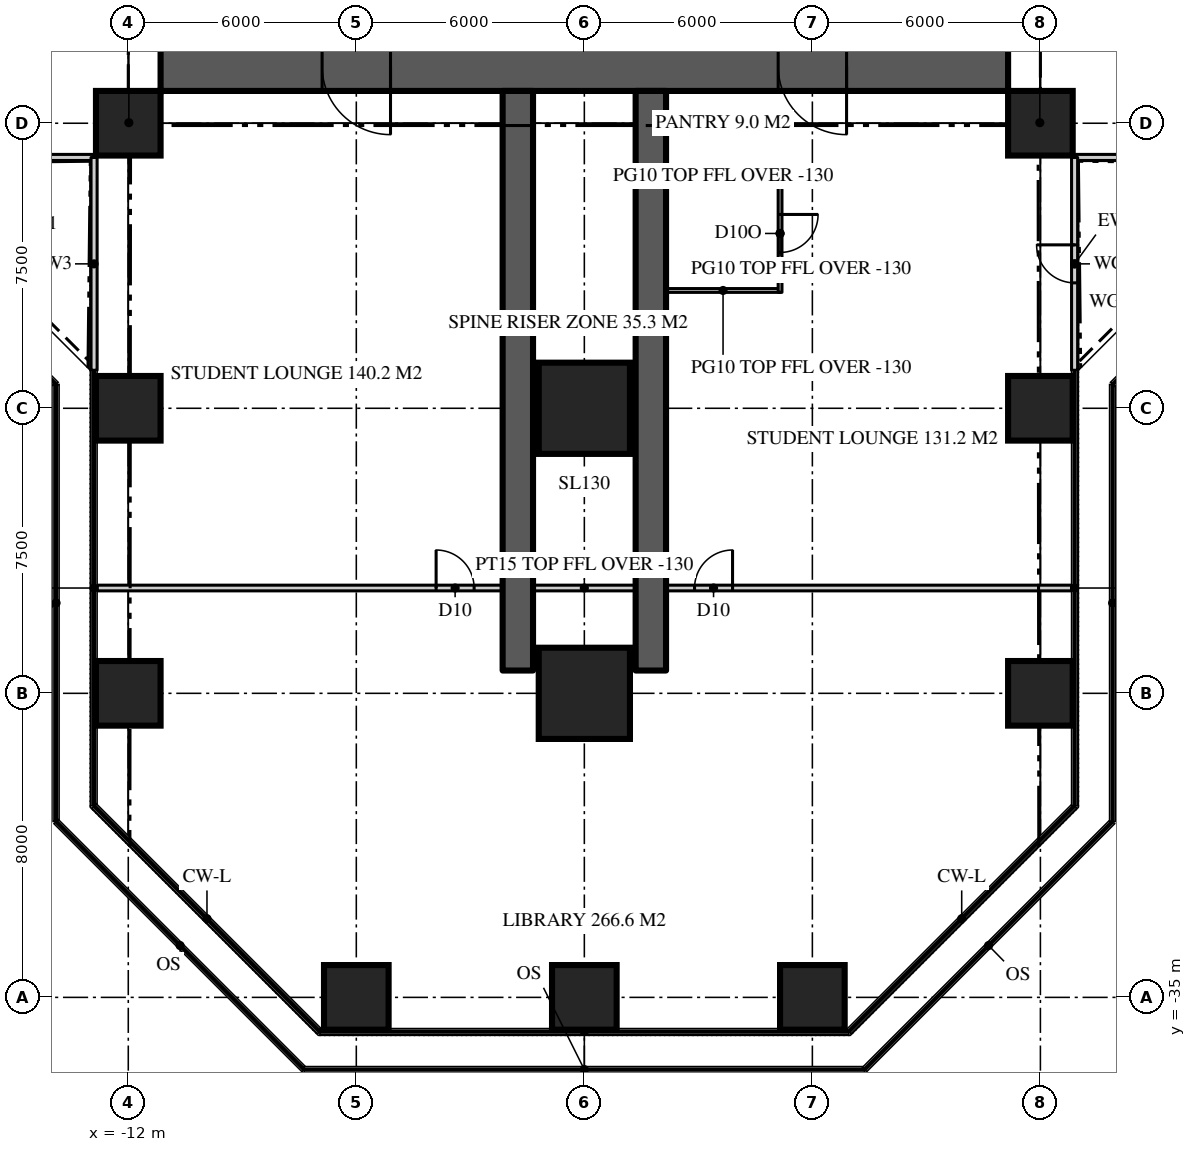
"""IFC4 building model, lengths in metres.
Left out: names, types, materials, properties, quantities, classifications, styles, units other than length and angle.
Written with IfcOpenShell. Run it as: python <this file> out.ifc"""

import sys

from ifc_helpers import new_model, si_unit, direction, frame, frame_2d, origin, origin_2d, place, context, subcontext, project, spatial, rectangle, extrude, element, fill, save


model = new_model("IFC4")
c1 = context("Model", 3, precision=1e-05, world=origin(), true_north=direction((0.0, 1.0)))
c2 = subcontext(c1, "Body", "Model", "MODEL_VIEW")
j1 = project(units=[si_unit("LENGTHUNIT", "METRE"), si_unit("PLANEANGLEUNIT", "RADIAN")], contexts=[c1])
p1 = place(None, origin())
s1 = spatial("IfcSite", under=j1, at=p1, CompositionType="ELEMENT")
p2 = place(p1, origin())
s2 = spatial("IfcBuilding", under=s1, at=p2, CompositionType="ELEMENT")
p3 = place(p2, frame((0.0, 0.0, 102.0)))
s3 = spatial("IfcBuildingStorey", under=s2, at=p3, CompositionType="ELEMENT", Elevation=102.0)
p4 = place(p3, frame((11.15, -10.5, 0.0), z_axis=(0.0, 0.0, 1.0), x_axis=(-1.0, 0.0, 0.0)))
e1 = element("IfcWall", 1, at=p4, inside=s3, PredefinedType="SHEAR", context=c2, shape_type="SweptSolid", body=[
    extrude(rectangle(XDim=22.3, YDim=1.3, at=frame_2d((11.15, 0.0))), origin(), (0.0, 0.0, 1.0), 3.9),
])
p5 = place(p4, frame((16.25, 0.0, 0.0)))
e2 = element("IfcOpeningElement", 2, at=p5, cuts=e1, PredefinedType="OPENING", context=c2, shape_type="SweptSolid", body=[
    extrude(rectangle(XDim=1.8, YDim=2.2, at=frame_2d((0.9, 1.1))), frame((0.0, 0.66, 0.0), z_axis=(0.0, -1.0, 0.0), x_axis=(1.0, 0.0, 0.0)), (0.0, 0.0, 1.0), 1.32),
])
p6 = place(p4, frame((4.25, 0.0, 0.0)))
e3 = element("IfcOpeningElement", 3, at=p6, cuts=e1, PredefinedType="OPENING", context=c2, shape_type="SweptSolid", body=[
    extrude(rectangle(XDim=1.8, YDim=2.2, at=frame_2d((0.9, 1.1))), frame((0.0, 0.66, 0.0), z_axis=(0.0, -1.0, 0.0), x_axis=(1.0, 0.0, 0.0)), (0.0, 0.0, 1.0), 1.32),
])
for number, where, z_axis, x_axis in (
    (4, (-1.75, -11.15, 0.0), (0.0, 0.0, 1.0), (0.0, -1.0, 0.0)),
    (5, (1.75, -11.15, 0.0), (0.0, 0.0, 1.0), (0.0, -1.0, 0.0)),
):
    element("IfcWall", number, at=place(p3, frame(where, z_axis=z_axis, x_axis=x_axis)), inside=s3, PredefinedType="SHEAR", context=c2, shape_type="SweptSolid", body=[
        extrude(rectangle(XDim=15.25, YDim=0.8, at=frame_2d((7.625, 0.0))), origin(), (0.0, 0.0, 1.0), 3.9),
    ])
for number, where, z_axis, x_axis in (
    (6, (-6.0, -35.0, 0.0), (0.0, 0.0, 1.0), (1.0, 0.0, 0.0)),
    (7, (0.0, -35.0, 0.0), (0.0, 0.0, 1.0), (1.0, 0.0, 0.0)),
    (8, (6.0, -35.0, 0.0), (0.0, 0.0, 1.0), (1.0, 0.0, 0.0)),
    (9, (-12.0, -27.0, 0.0), (0.0, 0.0, 1.0), (1.0, 0.0, 0.0)),
):
    element("IfcColumn", number, at=place(p3, frame(where, z_axis=z_axis, x_axis=x_axis)), inside=s3, PredefinedType="COLUMN", context=c2, shape_type="SweptSolid", body=[
        extrude(rectangle(XDim=1.7, YDim=1.7, at=origin_2d()), origin(), (0.0, 0.0, 1.0), 3.9),
    ])
p7 = place(p3, frame((0.0, -27.0, 0.0), z_axis=(0.0, 0.0, 1.0), x_axis=(1.0, 0.0, 0.0)))
e10 = element("IfcColumn", 10, at=p7, inside=s3, PredefinedType="COLUMN", context=c2, shape_type="SweptSolid", body=[
    extrude(rectangle(XDim=2.4, YDim=2.4, at=origin_2d()), origin(), (0.0, 0.0, 1.0), 3.9),
])
for number, where, z_axis, x_axis in (
    (11, (12.0, -27.0, 0.0), (0.0, 0.0, 1.0), (1.0, 0.0, 0.0)),
    (12, (-12.0, -19.5, 0.0), (0.0, 0.0, 1.0), (1.0, 0.0, 0.0)),
):
    element("IfcColumn", number, at=place(p3, frame(where, z_axis=z_axis, x_axis=x_axis)), inside=s3, PredefinedType="COLUMN", context=c2, shape_type="SweptSolid", body=[
        extrude(rectangle(XDim=1.7, YDim=1.7, at=origin_2d()), origin(), (0.0, 0.0, 1.0), 3.9),
    ])
p8 = place(p3, frame((0.0, -19.5, 0.0), z_axis=(0.0, 0.0, 1.0), x_axis=(1.0, 0.0, 0.0)))
e13 = element("IfcColumn", 13, at=p8, inside=s3, PredefinedType="COLUMN", context=c2, shape_type="SweptSolid", body=[
    extrude(rectangle(XDim=2.4, YDim=2.4, at=origin_2d()), origin(), (0.0, 0.0, 1.0), 3.9),
])
for number, where, z_axis, x_axis in (
    (14, (12.0, -19.5, 0.0), (0.0, 0.0, 1.0), (1.0, 0.0, 0.0)),
    (15, (-12.0, -12.0, 0.0), (0.0, 0.0, 1.0), (1.0, 0.0, 0.0)),
    (16, (12.0, -12.0, 0.0), (0.0, 0.0, 1.0), (1.0, 0.0, 0.0)),
):
    element("IfcColumn", number, at=place(p3, frame(where, z_axis=z_axis, x_axis=x_axis)), inside=s3, PredefinedType="COLUMN", context=c2, shape_type="SweptSolid", body=[
        extrude(rectangle(XDim=1.7, YDim=1.7, at=origin_2d()), origin(), (0.0, 0.0, 1.0), 3.9),
    ])
p9 = place(p3, frame((12.9, -12.9, 0.0), z_axis=(0.0, 0.0, 1.0), x_axis=(1.0, 0.0, 0.0)))
e17 = element("IfcWall", 17, at=p9, inside=s3, PredefinedType="SOLIDWALL", context=c2, shape_type="SweptSolid", body=[
    extrude(rectangle(XDim=5.6, YDim=0.16, at=frame_2d((2.8, 0.0))), origin(), (0.0, 0.0, 1.0), 3.77),
])
p10 = place(p3, frame((-18.5, -12.9, 0.0), z_axis=(0.0, 0.0, 1.0), x_axis=(1.0, 0.0, 0.0)))
e18 = element("IfcWall", 18, at=p10, inside=s3, PredefinedType="SOLIDWALL", context=c2, shape_type="SweptSolid", body=[
    extrude(rectangle(XDim=5.6, YDim=0.16, at=frame_2d((2.8, 0.0))), origin(), (0.0, 0.0, 1.0), 3.77),
])
p11 = place(p10, frame((2.3, 0.0, 0.0)))
e19 = element("IfcOpeningElement", 19, at=p11, cuts=e18, PredefinedType="OPENING", context=c2, shape_type="SweptSolid", body=[
    extrude(rectangle(XDim=1.0, YDim=2.2, at=frame_2d((0.5, 1.1))), frame((0.0, 0.09, 0.0), z_axis=(0.0, -1.0, 0.0), x_axis=(1.0, 0.0, 0.0)), (0.0, 0.0, 1.0), 0.18),
])
p12 = place(p3, frame((-12.9, -12.9, 0.0), z_axis=(0.0, 0.0, 1.0), x_axis=(0.0, -1.0, 0.0)))
e20 = element("IfcWall", 20, at=p12, inside=s3, PredefinedType="SOLIDWALL", context=c2, shape_type="SweptSolid", body=[
    extrude(rectangle(XDim=5.6, YDim=0.16, at=frame_2d((2.8, 0.0))), origin(), (0.0, 0.0, 1.0), 3.77),
])
p13 = place(p3, frame((12.9, -18.5, 0.0), z_axis=(0.0, 0.0, 1.0), x_axis=(0.0, 1.0, 0.0)))
e21 = element("IfcWall", 21, at=p13, inside=s3, PredefinedType="SOLIDWALL", context=c2, shape_type="SweptSolid", body=[
    extrude(rectangle(XDim=5.6, YDim=0.16, at=frame_2d((2.8, 0.0))), origin(), (0.0, 0.0, 1.0), 3.77),
])
p14 = place(p13, frame((2.3, 0.0, 0.0)))
e22 = element("IfcOpeningElement", 22, at=p14, cuts=e21, PredefinedType="OPENING", context=c2, shape_type="SweptSolid", body=[
    extrude(rectangle(XDim=1.0, YDim=2.2, at=frame_2d((0.5, 1.1))), frame((0.0, 0.09, 0.0), z_axis=(0.0, -1.0, 0.0), x_axis=(1.0, 0.0, 0.0)), (0.0, 0.0, 1.0), 0.18),
])
p15 = place(p3, frame((-12.82, -24.229, 0.0), z_axis=(0.0, 0.0, 1.0), x_axis=(1.0, 0.0, 0.0)))
e23 = element("IfcWall", 23, at=p15, inside=s3, PredefinedType="PARTITIONING", context=c2, shape_type="SweptSolid", body=[
    extrude(rectangle(XDim=25.64, YDim=0.15, at=frame_2d((12.82, 0.0))), origin(), (0.0, 0.0, 1.0), 3.77),
])
p16 = place(p15, frame((15.72, 0.0, 0.0)))
e24 = element("IfcOpeningElement", 24, at=p16, cuts=e23, PredefinedType="OPENING", context=c2, shape_type="SweptSolid", body=[
    extrude(rectangle(XDim=1.0, YDim=2.2, at=frame_2d((0.5, 1.1))), frame((0.0, 0.085, 0.0), z_axis=(0.0, -1.0, 0.0), x_axis=(1.0, 0.0, 0.0)), (0.0, 0.0, 1.0), 0.17),
])
p17 = place(p15, frame((8.92, 0.0, 0.0)))
e25 = element("IfcOpeningElement", 25, at=p17, cuts=e23, PredefinedType="OPENING", context=c2, shape_type="SweptSolid", body=[
    extrude(rectangle(XDim=1.0, YDim=2.2, at=frame_2d((0.5, 1.1))), frame((0.0, 0.085, 0.0), z_axis=(0.0, -1.0, 0.0), x_axis=(1.0, 0.0, 0.0)), (0.0, 0.0, 1.0), 0.17),
])
for number, where, z_axis, x_axis in (
    (26, (2.15, -13.4, 0.0), (0.0, 0.0, 1.0), (1.0, 0.0, 0.0)),
    (27, (2.15, -16.4, 0.0), (0.0, 0.0, 1.0), (1.0, 0.0, 0.0)),
):
    element("IfcWall", number, at=place(p3, frame(where, z_axis=z_axis, x_axis=x_axis)), inside=s3, PredefinedType="PARTITIONING", context=c2, shape_type="SweptSolid", body=[
        extrude(rectangle(XDim=3.0, YDim=0.1, at=frame_2d((1.5, 0.0))), origin(), (0.0, 0.0, 1.0), 3.77),
    ])
p18 = place(p3, frame((5.15, -13.35, 0.0), z_axis=(0.0, 0.0, 1.0), x_axis=(0.0, -1.0, 0.0)))
e28 = element("IfcWall", 28, at=p18, inside=s3, PredefinedType="PARTITIONING", context=c2, shape_type="SweptSolid", body=[
    extrude(rectangle(XDim=3.1, YDim=0.1, at=frame_2d((1.55, 0.0))), origin(), (0.0, 0.0, 1.0), 3.77),
])
p19 = place(p18, frame((1.05, 0.0, 0.0)))
e29 = element("IfcOpeningElement", 29, at=p19, cuts=e28, PredefinedType="OPENING", context=c2, shape_type="SweptSolid", body=[
    extrude(rectangle(XDim=1.0, YDim=2.2, at=frame_2d((0.5, 1.1))), frame((0.0, 0.06, 0.0), z_axis=(0.0, -1.0, 0.0), x_axis=(1.0, 0.0, 0.0)), (0.0, 0.0, 1.0), 0.12),
])
for number, where, z_axis, x_axis in (
    (30, (-11.15, -11.15, 0.0), (0.0, 0.0, 1.0), (-0.707, -0.707, 0.0)),
    (31, (11.15, -11.15, 0.0), (0.0, 0.0, 1.0), (0.707, -0.707, 0.0)),
):
    element("IfcWall", number, at=place(p3, frame(where, z_axis=z_axis, x_axis=x_axis)), inside=s3, PredefinedType="PARTITIONING", context=c2, shape_type="SweptSolid", body=[
        extrude(rectangle(XDim=2.362, YDim=0.15, at=frame_2d((1.181, 0.0))), origin(), (0.0, 0.0, 1.0), 3.22),
    ])
p20 = place(p14, origin())
e32 = element("IfcDoor", 32, at=p20, inside=s3, OperationType="SINGLE_SWING_RIGHT", PredefinedType="DOOR", context=c2, shape_type="SweptSolid", body=[
    extrude(rectangle(XDim=1.0, YDim=2.2, at=frame_2d((0.5, 1.1))), frame((0.0, 0.025, 0.0), z_axis=(0.0, -1.0, 0.0), x_axis=(1.0, 0.0, 0.0)), (0.0, 0.0, 1.0), 0.05),
])
fill(e22, e32)
p21 = place(p5, origin())
e33 = element("IfcDoor", 33, at=p21, inside=s3, OperationType="DOUBLE_DOOR_DOUBLE_SWING", PredefinedType="DOOR", context=c2, shape_type="SweptSolid", body=[
    extrude(rectangle(XDim=1.8, YDim=2.2, at=frame_2d((0.9, 1.1))), frame((0.0, 0.025, 0.0), z_axis=(0.0, -1.0, 0.0), x_axis=(1.0, 0.0, 0.0)), (0.0, 0.0, 1.0), 0.05),
])
fill(e2, e33)
p22 = place(p6, origin())
e34 = element("IfcDoor", 34, at=p22, inside=s3, OperationType="DOUBLE_DOOR_DOUBLE_SWING", PredefinedType="DOOR", context=c2, shape_type="SweptSolid", body=[
    extrude(rectangle(XDim=1.8, YDim=2.2, at=frame_2d((0.9, 1.1))), frame((0.0, 0.025, 0.0), z_axis=(0.0, -1.0, 0.0), x_axis=(1.0, 0.0, 0.0)), (0.0, 0.0, 1.0), 0.05),
])
fill(e3, e34)
p23 = place(p16, origin())
e35 = element("IfcDoor", 35, at=p23, inside=s3, OperationType="SINGLE_SWING_RIGHT", PredefinedType="DOOR", context=c2, shape_type="SweptSolid", body=[
    extrude(rectangle(XDim=1.0, YDim=2.2, at=frame_2d((0.5, 1.1))), frame((0.0, 0.025, 0.0), z_axis=(0.0, -1.0, 0.0), x_axis=(1.0, 0.0, 0.0)), (0.0, 0.0, 1.0), 0.05),
])
fill(e24, e35)
p24 = place(p17, origin())
e36 = element("IfcDoor", 36, at=p24, inside=s3, OperationType="SINGLE_SWING_LEFT", PredefinedType="DOOR", context=c2, shape_type="SweptSolid", body=[
    extrude(rectangle(XDim=1.0, YDim=2.2, at=frame_2d((0.5, 1.1))), frame((0.0, 0.025, 0.0), z_axis=(0.0, -1.0, 0.0), x_axis=(1.0, 0.0, 0.0)), (0.0, 0.0, 1.0), 0.05),
])
fill(e25, e36)
p25 = place(p19, origin())
e37 = element("IfcDoor", 37, at=p25, inside=s3, OperationType="SINGLE_SWING_LEFT", PredefinedType="DOOR", context=c2, shape_type="SweptSolid", body=[
    extrude(rectangle(XDim=1.0, YDim=2.2, at=frame_2d((0.5, 1.1))), frame((0.0, 0.025, 0.0), z_axis=(0.0, -1.0, 0.0), x_axis=(1.0, 0.0, 0.0)), (0.0, 0.0, 1.0), 0.05),
])
fill(e29, e37)
save(model, sys.argv[1])
